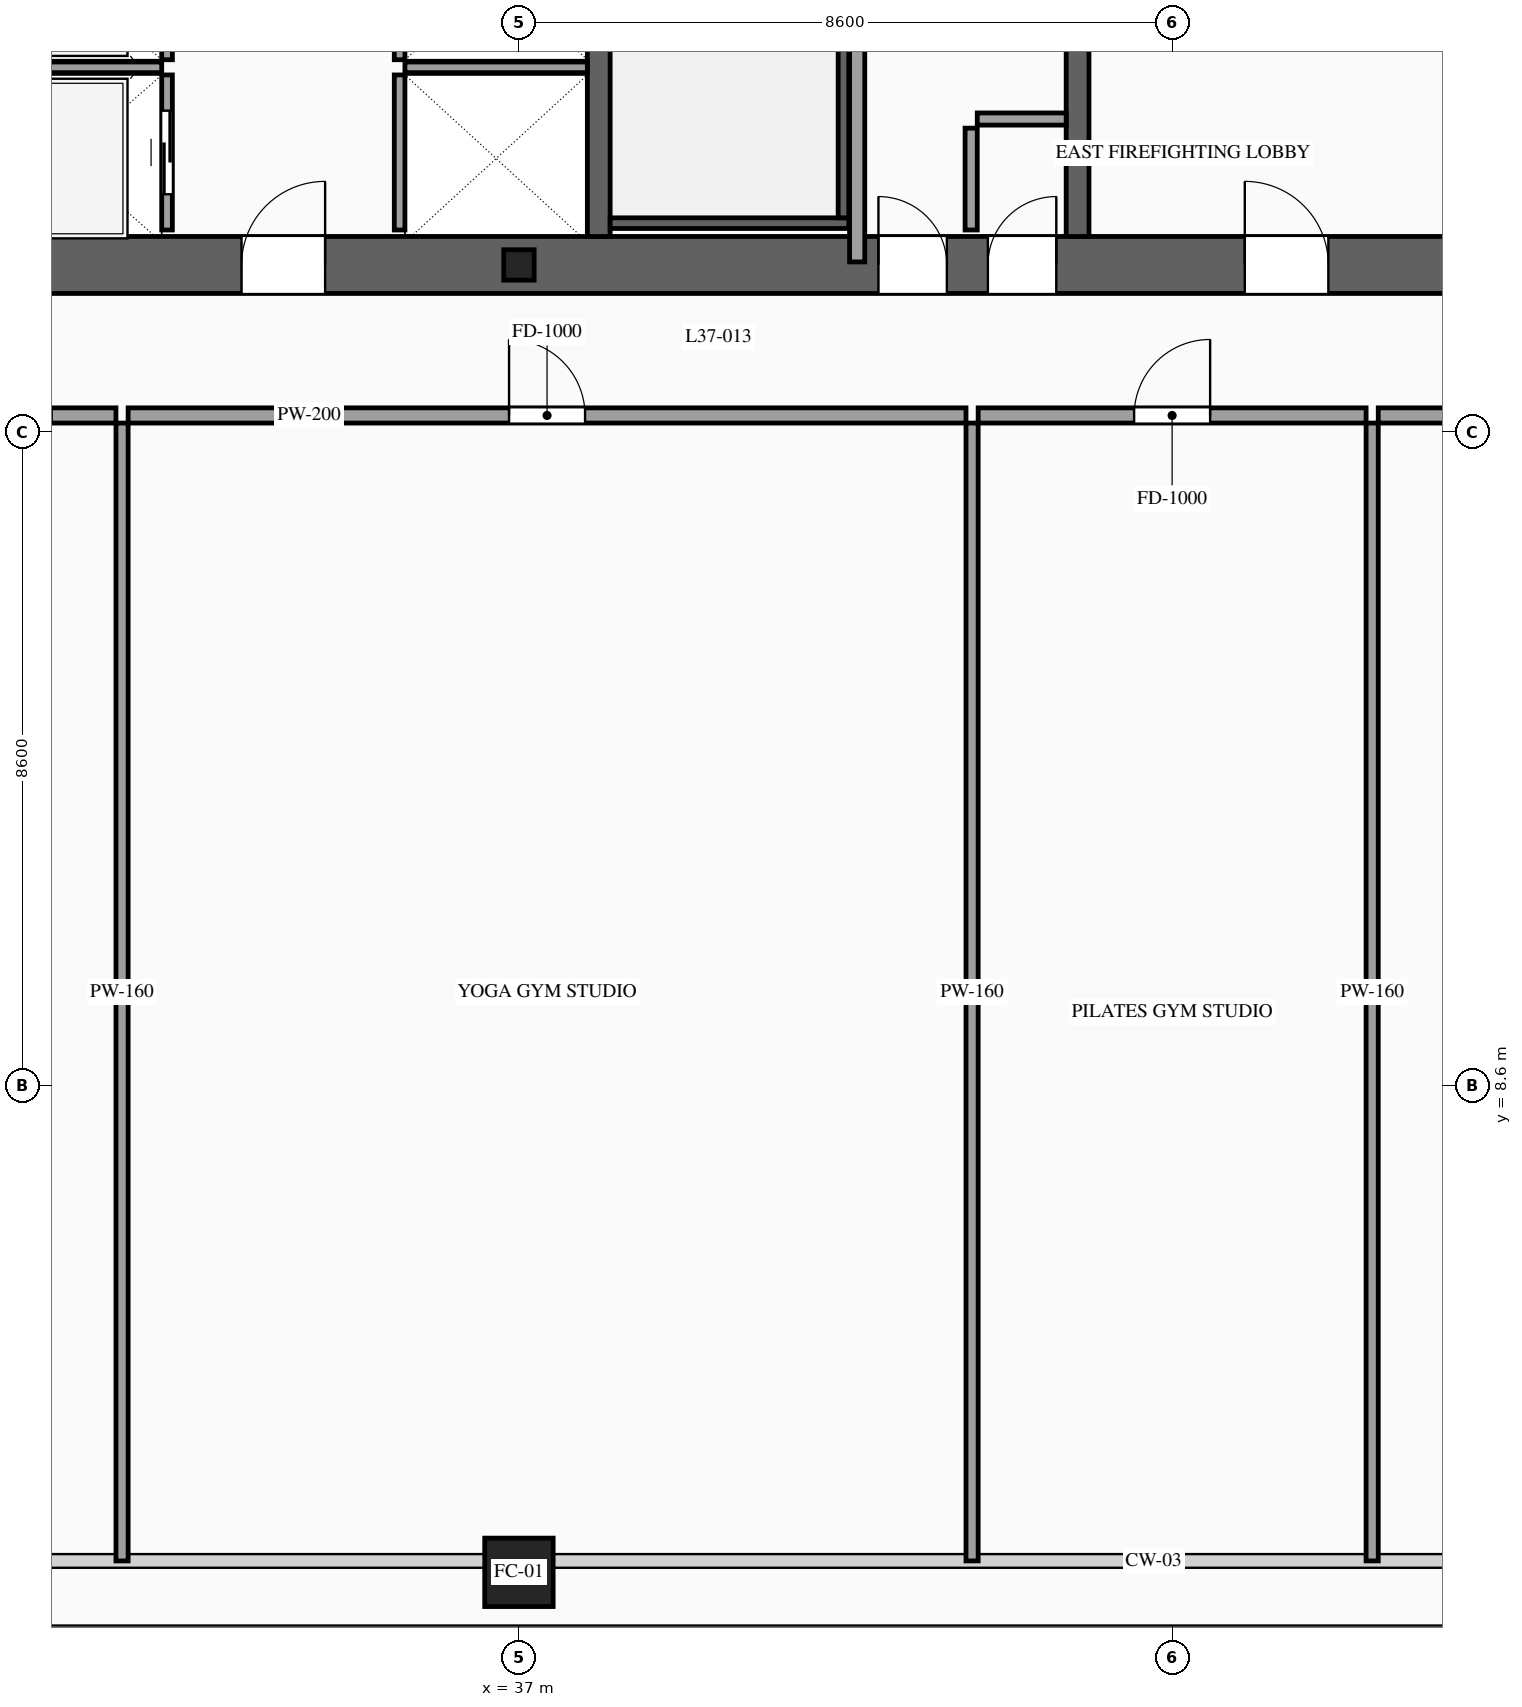
"""IFC4 building model, lengths in metres.
Left out: names, types, materials, properties, quantities, classifications, styles, units other than length and angle.
Written with IfcOpenShell. Run it as: python <this file> out.ifc"""

import sys

from ifc_helpers import new_model, si_unit, direction, frame, frame_2d, origin, origin_2d, place, context, subcontext, project, spatial, rectangle, hollow_rectangle, i_section, extrude, source, transform, mapped, element, fill, save


model = new_model("IFC4")
c1 = context("Model", 3, precision=1e-05, world=origin(), true_north=direction((0.0, 1.0)))
c2 = subcontext(c1, "Body", "Model", "MODEL_VIEW")
j1 = project(units=[si_unit("LENGTHUNIT", "METRE"), si_unit("PLANEANGLEUNIT", "RADIAN")], contexts=[c1])
p1 = place(None, origin())
s1 = spatial("IfcSite", under=j1, at=p1, CompositionType="ELEMENT")
p2 = place(p1, origin())
s2 = spatial("IfcBuilding", under=s1, at=p2, CompositionType="ELEMENT")
p3 = place(p2, frame((0.0, 0.0, 141.6)))
s3 = spatial("IfcBuildingStorey", under=s2, at=p3, CompositionType="ELEMENT", Elevation=141.6)
p4 = place(p3, frame((23.425, 19.4, 0.0), z_axis=(0.0, 0.0, 1.0), x_axis=(1.0, 0.0, 0.0)))
e1 = element("IfcWall", 1, at=p4, inside=s3, PredefinedType="SHEAR", context=c2, shape_type="SweptSolid", body=[
    extrude(rectangle(XDim=27.15, YDim=0.75, at=frame_2d((13.575, 0.0))), origin(), (0.0, 0.0, 1.0), 3.6),
])
p5 = place(p4, frame((2.025, 0.0, 0.0)))
e2 = element("IfcOpeningElement", 2, at=p5, cuts=e1, PredefinedType="OPENING", context=c2, shape_type="SweptSolid", body=[
    extrude(rectangle(XDim=1.1, YDim=2.2, at=frame_2d((0.55, 1.1))), frame((0.0, 0.39, 0.0), z_axis=(0.0, -1.0, 0.0), x_axis=(1.0, 0.0, 0.0)), (0.0, 0.0, 1.0), 0.78),
])
p6 = place(p4, frame((9.925, 0.0, 0.0)))
e3 = element("IfcOpeningElement", 3, at=p6, cuts=e1, PredefinedType="OPENING", context=c2, shape_type="SweptSolid", body=[
    extrude(rectangle(XDim=1.1, YDim=2.2, at=frame_2d((0.55, 1.1))), frame((0.0, 0.39, 0.0), z_axis=(0.0, -1.0, 0.0), x_axis=(1.0, 0.0, 0.0)), (0.0, 0.0, 1.0), 0.78),
])
p7 = place(p4, frame((23.125, 0.0, 0.0)))
e4 = element("IfcOpeningElement", 4, at=p7, cuts=e1, PredefinedType="OPENING", context=c2, shape_type="SweptSolid", body=[
    extrude(rectangle(XDim=1.1, YDim=2.2, at=frame_2d((0.55, 1.1))), frame((0.0, 0.39, 0.0), z_axis=(0.0, -1.0, 0.0), x_axis=(1.0, 0.0, 0.0)), (0.0, 0.0, 1.0), 0.78),
])
p8 = place(p4, frame((19.745, 0.0, 0.0)))
e5 = element("IfcOpeningElement", 5, at=p8, cuts=e1, PredefinedType="OPENING", context=c2, shape_type="SweptSolid", body=[
    extrude(rectangle(XDim=0.9, YDim=2.15, at=frame_2d((0.45, 1.075))), frame((0.0, 0.39, 0.0), z_axis=(0.0, -1.0, 0.0), x_axis=(1.0, 0.0, 0.0)), (0.0, 0.0, 1.0), 0.78),
])
p9 = place(p4, frame((18.305, 0.0, 0.0)))
e6 = element("IfcOpeningElement", 6, at=p9, cuts=e1, PredefinedType="OPENING", context=c2, shape_type="SweptSolid", body=[
    extrude(rectangle(XDim=0.9, YDim=2.15, at=frame_2d((0.45, 1.075))), frame((0.0, 0.39, 0.0), z_axis=(0.0, -1.0, 0.0), x_axis=(1.0, 0.0, 0.0)), (0.0, 0.0, 1.0), 0.78),
])
m1 = source(origin(), c2, "Body", "SweptSolid", [
    extrude(rectangle(XDim=12.05, YDim=0.3, at=frame_2d((6.025, 0.0))), origin(), (0.0, 0.0, 1.0), 3.6),
])
for number, where, z_axis, x_axis in (
    (7, (38.05, 19.775, 0.0), (0.0, 0.0, 1.0), (0.0, 1.0, 0.0)),
    (8, (44.35, 19.775, 0.0), (0.0, 0.0, 1.0), (0.0, 1.0, 0.0)),
):
    element("IfcWall", number, at=place(p3, frame(where, z_axis=z_axis, x_axis=x_axis)), inside=s3, PredefinedType="SOLIDWALL", context=c2, shape_type="MappedRepresentation", body=[
        mapped(m1, transform((0.0, 0.0, 0.0), scale=1.0)),
    ])
m2 = source(origin(), c2, "Body", "SweptSolid", [
    extrude(i_section(OverallWidth=0.4, OverallDepth=0.4, WebThickness=0.013, FlangeThickness=0.021, at=origin_2d()), origin(), (0.0, 0.0, 1.0), 3.6),
])
p10 = place(p3, frame((37.0, 19.4, 0.0), z_axis=(0.0, 0.0, 1.0), x_axis=(1.0, 0.0, 0.0)))
e9 = element("IfcColumn", 9, at=p10, inside=s3, PredefinedType="COLUMN", context=c2, shape_type="MappedRepresentation", body=[
    mapped(m2, transform((0.0, 0.0, 0.0), scale=1.0)),
])
m3 = source(origin(), c2, "Body", "SweptSolid", [
    extrude(hollow_rectangle(XDim=0.9, YDim=0.9, WallThickness=0.042, at=origin_2d()), origin(), (0.0, 0.0, 1.0), 3.6),
])
p11 = place(p3, frame((37.0, 2.2, 0.0), z_axis=(0.0, 0.0, 1.0), x_axis=(1.0, 0.0, 0.0)))
e10 = element("IfcColumn", 10, at=p11, inside=s3, PredefinedType="COLUMN", context=c2, shape_type="MappedRepresentation", body=[
    mapped(m3, transform((0.0, 0.0, 0.0), scale=1.0)),
])
p12 = place(p3, frame((32.37, 19.86, 0.0), z_axis=(0.0, 0.0, 1.0), x_axis=(0.0, 1.0, 0.0)))
e11 = element("IfcWall", 11, at=p12, inside=s3, PredefinedType="SOLIDWALL", context=c2, shape_type="SweptSolid", body=[
    extrude(rectangle(XDim=2.04, YDim=0.14, at=frame_2d((1.02, 0.0))), origin(), (0.0, 0.0, 1.0), 3.38),
])
p13 = place(p12, frame((0.47, 0.0, 0.0)))
e12 = element("IfcOpeningElement", 12, at=p13, cuts=e11, PredefinedType="OPENING", context=c2, shape_type="SweptSolid", body=[
    extrude(rectangle(XDim=1.1, YDim=2.2, at=frame_2d((0.55, 1.1))), frame((0.0, 0.085, 0.0), z_axis=(0.0, -1.0, 0.0), x_axis=(1.0, 0.0, 0.0)), (0.0, 0.0, 1.0), 0.17),
])
m4 = source(origin(), c2, "Body", "SweptSolid", [
    extrude(rectangle(XDim=2.5, YDim=0.14, at=frame_2d((1.25, 0.0))), origin(), (0.0, 0.0, 1.0), 3.38),
])
p14 = place(p3, frame((29.8, 22.0, 0.0), z_axis=(0.0, 0.0, 1.0), x_axis=(1.0, 0.0, 0.0)))
e13 = element("IfcWall", 13, at=p14, inside=s3, PredefinedType="SOLIDWALL", context=c2, shape_type="MappedRepresentation", body=[
    mapped(m4, transform((0.0, 0.0, 0.0), scale=1.0)),
])
p15 = place(p3, frame((32.37, 22.1, 0.0), z_axis=(0.0, 0.0, 1.0), x_axis=(0.0, 1.0, 0.0)))
e14 = element("IfcWall", 14, at=p15, inside=s3, PredefinedType="SOLIDWALL", context=c2, shape_type="SweptSolid", body=[
    extrude(rectangle(XDim=2.2, YDim=0.14, at=frame_2d((1.1, 0.0))), origin(), (0.0, 0.0, 1.0), 3.38),
])
p16 = place(p15, frame((0.55, 0.0, 0.0)))
e15 = element("IfcOpeningElement", 15, at=p16, cuts=e14, PredefinedType="OPENING", context=c2, shape_type="SweptSolid", body=[
    extrude(rectangle(XDim=1.1, YDim=2.2, at=frame_2d((0.55, 1.1))), frame((0.0, 0.085, 0.0), z_axis=(0.0, -1.0, 0.0), x_axis=(1.0, 0.0, 0.0)), (0.0, 0.0, 1.0), 0.17),
])
m5 = source(origin(), c2, "Body", "SweptSolid", [
    extrude(rectangle(XDim=2.04, YDim=0.14, at=frame_2d((1.02, 0.0))), origin(), (0.0, 0.0, 1.0), 3.38),
])
p17 = place(p3, frame((35.43, 19.86, 0.0), z_axis=(0.0, 0.0, 1.0), x_axis=(0.0, 1.0, 0.0)))
e16 = element("IfcWall", 16, at=p17, inside=s3, PredefinedType="SOLIDWALL", context=c2, shape_type="MappedRepresentation", body=[
    mapped(m5, transform((0.0, 0.0, 0.0), scale=1.0)),
])
m6 = source(origin(), c2, "Body", "SweptSolid", [
    extrude(rectangle(XDim=2.4, YDim=0.14, at=frame_2d((1.2, 0.0))), origin(), (0.0, 0.0, 1.0), 3.38),
])
p18 = place(p3, frame((35.5, 22.0, 0.0), z_axis=(0.0, 0.0, 1.0), x_axis=(1.0, 0.0, 0.0)))
e17 = element("IfcWall", 17, at=p18, inside=s3, PredefinedType="SOLIDWALL", context=c2, shape_type="MappedRepresentation", body=[
    mapped(m6, transform((0.0, 0.0, 0.0), scale=1.0)),
])
m7 = source(origin(), c2, "Body", "SweptSolid", [
    extrude(rectangle(XDim=2.2, YDim=0.14, at=frame_2d((1.1, 0.0))), origin(), (0.0, 0.0, 1.0), 3.38),
])
p19 = place(p3, frame((35.43, 22.1, 0.0), z_axis=(0.0, 0.0, 1.0), x_axis=(0.0, 1.0, 0.0)))
e18 = element("IfcWall", 18, at=p19, inside=s3, PredefinedType="SOLIDWALL", context=c2, shape_type="MappedRepresentation", body=[
    mapped(m7, transform((0.0, 0.0, 0.0), scale=1.0)),
])
m8 = source(origin(), c2, "Body", "SweptSolid", [
    extrude(rectangle(XDim=3.14, YDim=0.14, at=frame_2d((1.57, 0.0))), origin(), (0.0, 0.0, 1.0), 3.38),
])
p20 = place(p3, frame((38.2, 19.95, 0.0), z_axis=(0.0, 0.0, 1.0), x_axis=(1.0, 0.0, 0.0)))
e19 = element("IfcWall", 19, at=p20, inside=s3, PredefinedType="SOLIDWALL", context=c2, shape_type="MappedRepresentation", body=[
    mapped(m8, transform((0.0, 0.0, 0.0), scale=1.0)),
])
m9 = source(origin(), c2, "Body", "SweptSolid", [
    extrude(rectangle(XDim=8.94, YDim=0.14, at=frame_2d((4.47, 0.0))), origin(), (0.0, 0.0, 1.0), 3.38),
])
p21 = place(p3, frame((41.27, 20.02, 0.0), z_axis=(0.0, 0.0, 1.0), x_axis=(0.0, 1.0, 0.0)))
e20 = element("IfcWall", 20, at=p21, inside=s3, PredefinedType="SOLIDWALL", context=c2, shape_type="MappedRepresentation", body=[
    mapped(m9, transform((0.0, 0.0, 0.0), scale=1.0)),
])
m10 = source(origin(), c2, "Body", "SweptSolid", [
    extrude(rectangle(XDim=1.34, YDim=0.16, at=frame_2d((0.67, 0.0))), origin(), (0.0, 0.0, 1.0), 3.38),
])
p22 = place(p3, frame((42.95, 19.86, 0.0), z_axis=(0.0, 0.0, 1.0), x_axis=(0.0, 1.0, 0.0)))
e21 = element("IfcWall", 21, at=p22, inside=s3, PredefinedType="PARTITIONING", context=c2, shape_type="MappedRepresentation", body=[
    mapped(m10, transform((0.0, 0.0, 0.0), scale=1.0)),
])
m11 = source(origin(), c2, "Body", "SweptSolid", [
    extrude(rectangle(XDim=1.17, YDim=0.16, at=frame_2d((0.585, 0.0))), origin(), (0.0, 0.0, 1.0), 3.38),
])
p23 = place(p3, frame((43.03, 21.32, 0.0), z_axis=(0.0, 0.0, 1.0), x_axis=(1.0, 0.0, 0.0)))
e22 = element("IfcWall", 22, at=p23, inside=s3, PredefinedType="PARTITIONING", context=c2, shape_type="MappedRepresentation", body=[
    mapped(m11, transform((0.0, 0.0, 0.0), scale=1.0)),
])
m12 = source(origin(), c2, "Body", "SweptSolid", [
    extrude(rectangle(XDim=6.51, YDim=0.2, at=frame_2d((3.255, 0.0))), origin(), (0.0, 0.0, 1.0), 3.38),
])
p24 = place(p3, frame((41.45, 19.44, 0.0), z_axis=(0.0, 0.0, 1.0), x_axis=(0.0, 1.0, 0.0)))
e23 = element("IfcWall", 23, at=p24, inside=s3, PredefinedType="PARTITIONING", context=c2, shape_type="MappedRepresentation", body=[
    mapped(m12, transform((0.0, 0.0, 0.0), scale=1.0)),
])
p25 = place(p3, frame((26.594, 17.42, 0.0), z_axis=(0.0, 0.0, 1.0), x_axis=(1.0, 0.0, 0.0)))
e24 = element("IfcWall", 24, at=p25, inside=s3, PredefinedType="PARTITIONING", context=c2, shape_type="SweptSolid", body=[
    extrude(rectangle(XDim=5.104, YDim=0.2, at=frame_2d((2.552, 0.0))), origin(), (0.0, 0.0, 1.0), 3.38),
])
p26 = place(p25, frame((3.257, 0.0, 0.0)))
e25 = element("IfcOpeningElement", 25, at=p26, cuts=e24, PredefinedType="OPENING", context=c2, shape_type="SweptSolid", body=[
    extrude(rectangle(XDim=1.0, YDim=2.2, at=frame_2d((0.5, 1.1))), frame((0.0, 0.115, 0.0), z_axis=(0.0, -1.0, 0.0), x_axis=(1.0, 0.0, 0.0)), (0.0, 0.0, 1.0), 0.23),
])
m13 = source(origin(), c2, "Body", "SweptSolid", [
    extrude(rectangle(XDim=14.97, YDim=0.16, at=frame_2d((7.485, 0.0))), origin(), (0.0, 0.0, 1.0), 3.38),
])
p27 = place(p3, frame((31.778, 2.35, 0.0), z_axis=(0.0, 0.0, 1.0), x_axis=(0.0, 1.0, 0.0)))
e26 = element("IfcWall", 26, at=p27, inside=s3, PredefinedType="PARTITIONING", context=c2, shape_type="MappedRepresentation", body=[
    mapped(m13, transform((0.0, 0.0, 0.0), scale=1.0)),
])
p28 = place(p3, frame((31.858, 17.42, 0.0), z_axis=(0.0, 0.0, 1.0), x_axis=(1.0, 0.0, 0.0)))
e27 = element("IfcWall", 27, at=p28, inside=s3, PredefinedType="PARTITIONING", context=c2, shape_type="SweptSolid", body=[
    extrude(rectangle(XDim=11.024, YDim=0.2, at=frame_2d((5.512, 0.0))), origin(), (0.0, 0.0, 1.0), 3.38),
])
p29 = place(p28, frame((5.012, 0.0, 0.0)))
e28 = element("IfcOpeningElement", 28, at=p29, cuts=e27, PredefinedType="OPENING", context=c2, shape_type="SweptSolid", body=[
    extrude(rectangle(XDim=1.0, YDim=2.2, at=frame_2d((0.5, 1.1))), frame((0.0, 0.115, 0.0), z_axis=(0.0, -1.0, 0.0), x_axis=(1.0, 0.0, 0.0)), (0.0, 0.0, 1.0), 0.23),
])
p30 = place(p3, frame((42.962, 2.35, 0.0), z_axis=(0.0, 0.0, 1.0), x_axis=(0.0, 1.0, 0.0)))
e29 = element("IfcWall", 29, at=p30, inside=s3, PredefinedType="PARTITIONING", context=c2, shape_type="MappedRepresentation", body=[
    mapped(m13, transform((0.0, 0.0, 0.0), scale=1.0)),
])
p31 = place(p3, frame((43.042, 17.42, 0.0), z_axis=(0.0, 0.0, 1.0), x_axis=(1.0, 0.0, 0.0)))
e30 = element("IfcWall", 30, at=p31, inside=s3, PredefinedType="PARTITIONING", context=c2, shape_type="SweptSolid", body=[
    extrude(rectangle(XDim=5.104, YDim=0.2, at=frame_2d((2.552, 0.0))), origin(), (0.0, 0.0, 1.0), 3.38),
])
p32 = place(p31, frame((2.052, 0.0, 0.0)))
e31 = element("IfcOpeningElement", 31, at=p32, cuts=e30, PredefinedType="OPENING", context=c2, shape_type="SweptSolid", body=[
    extrude(rectangle(XDim=1.0, YDim=2.2, at=frame_2d((0.5, 1.1))), frame((0.0, 0.115, 0.0), z_axis=(0.0, -1.0, 0.0), x_axis=(1.0, 0.0, 0.0)), (0.0, 0.0, 1.0), 0.23),
])
p33 = place(p3, frame((48.226, 2.35, 0.0), z_axis=(0.0, 0.0, 1.0), x_axis=(0.0, 1.0, 0.0)))
e32 = element("IfcWall", 32, at=p33, inside=s3, PredefinedType="PARTITIONING", context=c2, shape_type="MappedRepresentation", body=[
    mapped(m13, transform((0.0, 0.0, 0.0), scale=1.0)),
])
p34 = place(p3, frame((48.306, 17.42, 0.0), z_axis=(0.0, 0.0, 1.0), x_axis=(1.0, 0.0, 0.0)))
e33 = element("IfcWall", 33, at=p34, inside=s3, PredefinedType="PARTITIONING", context=c2, shape_type="SweptSolid", body=[
    extrude(rectangle(XDim=9.254, YDim=0.2, at=frame_2d((4.627, 0.0))), origin(), (0.0, 0.0, 1.0), 3.38),
])
p35 = place(p34, frame((4.127, 0.0, 0.0)))
e34 = element("IfcOpeningElement", 34, at=p35, cuts=e33, PredefinedType="OPENING", context=c2, shape_type="SweptSolid", body=[
    extrude(rectangle(XDim=1.0, YDim=2.2, at=frame_2d((0.5, 1.1))), frame((0.0, 0.115, 0.0), z_axis=(0.0, -1.0, 0.0), x_axis=(1.0, 0.0, 0.0)), (0.0, 0.0, 1.0), 0.23),
])
m14 = source(origin(), c2, "Body", "SweptSolid", [
    extrude(rectangle(XDim=1.1, YDim=2.2, at=frame_2d((0.55, 1.1))), frame((0.0, 0.025, 0.0), z_axis=(0.0, -1.0, 0.0), x_axis=(1.0, 0.0, 0.0)), (0.0, 0.0, 1.0), 0.05),
])
p36 = place(p13, origin())
e35 = element("IfcDoor", 35, at=p36, inside=s3, OperationType="SLIDING_TO_LEFT", PredefinedType="DOOR", context=c2, shape_type="MappedRepresentation", body=[
    mapped(m14, transform((0.0, 0.0, 0.0), scale=1.0)),
])
fill(e12, e35)
m15 = source(origin(), c2, "Body", "SweptSolid", [
    extrude(rectangle(XDim=1.1, YDim=2.2, at=frame_2d((0.55, 1.1))), frame((0.0, 0.025, 0.0), z_axis=(0.0, -1.0, 0.0), x_axis=(1.0, 0.0, 0.0)), (0.0, 0.0, 1.0), 0.05),
])
p37 = place(p6, origin())
e36 = element("IfcDoor", 36, at=p37, inside=s3, OperationType="SINGLE_SWING_RIGHT", PredefinedType="DOOR", context=c2, shape_type="MappedRepresentation", body=[
    mapped(m15, transform((0.0, 0.0, 0.0), scale=1.0)),
])
fill(e3, e36)
p38 = place(p7, origin())
e37 = element("IfcDoor", 37, at=p38, inside=s3, OperationType="SINGLE_SWING_LEFT", PredefinedType="DOOR", context=c2, shape_type="MappedRepresentation", body=[
    mapped(m15, transform((0.0, 0.0, 0.0), scale=1.0)),
])
fill(e4, e37)
m16 = source(origin(), c2, "Body", "SweptSolid", [
    extrude(rectangle(XDim=0.9, YDim=2.15, at=frame_2d((0.45, 1.075))), frame((0.0, 0.025, 0.0), z_axis=(0.0, -1.0, 0.0), x_axis=(1.0, 0.0, 0.0)), (0.0, 0.0, 1.0), 0.05),
])
p39 = place(p8, origin())
e38 = element("IfcDoor", 38, at=p39, inside=s3, OperationType="SINGLE_SWING_RIGHT", PredefinedType="DOOR", context=c2, shape_type="MappedRepresentation", body=[
    mapped(m16, transform((0.0, 0.0, 0.0), scale=1.0)),
])
fill(e5, e38)
p40 = place(p9, origin())
e39 = element("IfcDoor", 39, at=p40, inside=s3, OperationType="SINGLE_SWING_LEFT", PredefinedType="DOOR", context=c2, shape_type="MappedRepresentation", body=[
    mapped(m16, transform((0.0, 0.0, 0.0), scale=1.0)),
])
fill(e6, e39)
m17 = source(origin(), c2, "Body", "SweptSolid", [
    extrude(rectangle(XDim=1.0, YDim=2.2, at=frame_2d((0.5, 1.1))), frame((0.0, 0.025, 0.0), z_axis=(0.0, -1.0, 0.0), x_axis=(1.0, 0.0, 0.0)), (0.0, 0.0, 1.0), 0.05),
])
p41 = place(p29, origin())
e40 = element("IfcDoor", 40, at=p41, inside=s3, OperationType="SINGLE_SWING_LEFT", PredefinedType="DOOR", context=c2, shape_type="MappedRepresentation", body=[
    mapped(m17, transform((0.0, 0.0, 0.0), scale=1.0)),
])
fill(e28, e40)
p42 = place(p32, origin())
e41 = element("IfcDoor", 41, at=p42, inside=s3, OperationType="SINGLE_SWING_RIGHT", PredefinedType="DOOR", context=c2, shape_type="MappedRepresentation", body=[
    mapped(m17, transform((0.0, 0.0, 0.0), scale=1.0)),
])
fill(e31, e41)
save(model, sys.argv[1])
